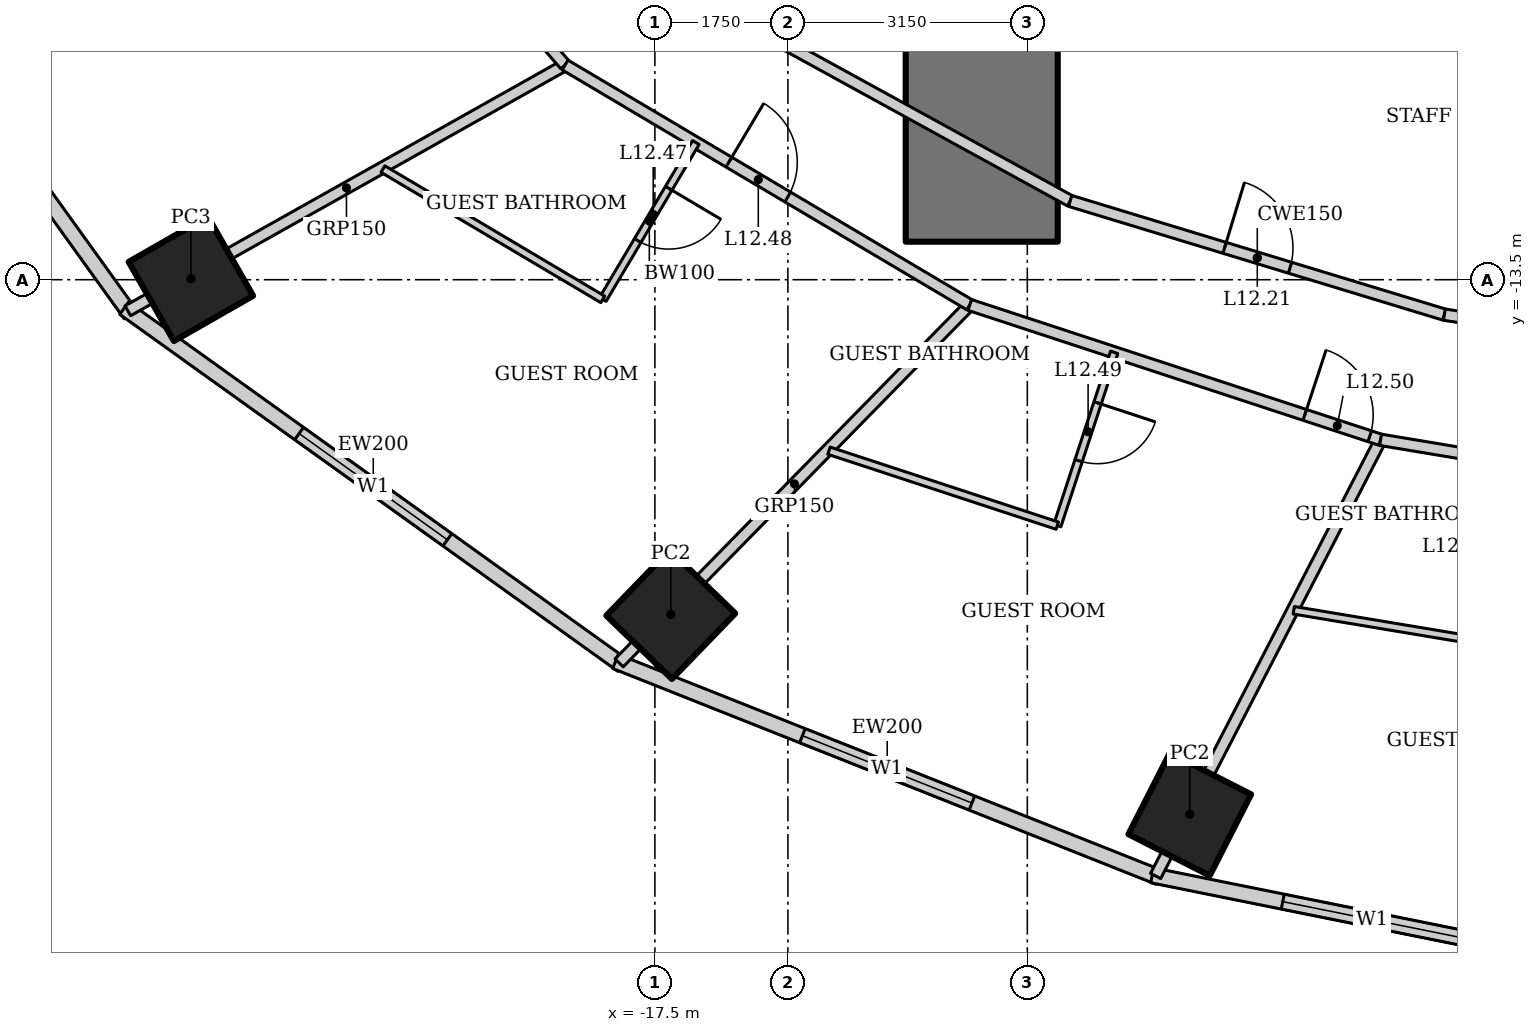
"""IFC4 building model, lengths in metres.
Left out: names, types, materials, properties, quantities, classifications, styles, units other than length and angle.
Written with IfcOpenShell. Run it as: python <this file> out.ifc"""

import sys

from ifc_helpers import new_model, si_unit, direction, frame, frame_2d, origin, origin_2d, place, context, subcontext, project, spatial, rectangle, hollow_rectangle, extrude, element, fill, save


model = new_model("IFC4")
c1 = context("Model", 3, precision=1e-05, world=origin(), true_north=direction((0.0, 1.0)))
c2 = subcontext(c1, "Body", "Model", "MODEL_VIEW")
j1 = project(units=[si_unit("LENGTHUNIT", "METRE"), si_unit("PLANEANGLEUNIT", "RADIAN")], contexts=[c1])
p1 = place(None, origin())
s1 = spatial("IfcSite", under=j1, at=p1, CompositionType="ELEMENT")
p2 = place(p1, origin())
s2 = spatial("IfcBuilding", under=s1, at=p2, CompositionType="ELEMENT")
p3 = place(p2, frame((0.0, 0.0, 58.6)))
s3 = spatial("IfcBuildingStorey", under=s2, at=p3, CompositionType="ELEMENT", Elevation=58.6)
p4 = place(p3, frame((-23.605, -13.489, 0.0), z_axis=(0.0, 0.0, 1.0), x_axis=(0.86824298017, 0.496139221777, 0.0)))
e1 = element("IfcColumn", 1, at=p4, inside=s3, PredefinedType="COLUMN", context=c2, shape_type="SweptSolid", body=[
    extrude(hollow_rectangle(XDim=1.2, YDim=1.2, WallThickness=0.12, at=origin_2d()), origin(), (0.0, 0.0, 1.0), 3.6),
])
for number, where, z_axis, x_axis in (
    (2, (-17.291, -17.905, 0.0), (0.0, 0.0, 1.0), (0.695, 0.719, 0.0)),
    (3, (-10.463, -20.534, 0.0), (0.0, 0.0, 1.0), (0.454, 0.891, 0.0)),
):
    element("IfcColumn", number, at=place(p3, frame(where, z_axis=z_axis, x_axis=x_axis)), inside=s3, PredefinedType="COLUMN", context=c2, shape_type="SweptSolid", body=[
        extrude(hollow_rectangle(XDim=1.2, YDim=1.2, WallThickness=0.1, at=origin_2d()), origin(), (0.0, 0.0, 1.0), 3.6),
    ])
p5 = place(p3, frame((-13.2, 13.0, 0.0), z_axis=(0.0, 0.0, 1.0), x_axis=(0.0, -1.0, 0.0)))
e4 = element("IfcWall", 4, at=p5, inside=s3, PredefinedType="SHEAR", context=c2, shape_type="SweptSolid", body=[
    extrude(rectangle(XDim=26.0, YDim=2.0, at=frame_2d((13.0, 0.0))), origin(), (0.0, 0.0, 1.0), 3.6),
])
p6 = place(p5, frame((12.1, 0.0, 0.0)))
e5 = element("IfcOpeningElement", 5, at=p6, cuts=e4, PredefinedType="OPENING", context=c2, shape_type="SweptSolid", body=[
    extrude(rectangle(XDim=1.8, YDim=2.1, at=frame_2d((0.9, 1.05))), frame((0.0, 1.01, 0.0), z_axis=(0.0, -1.0, 0.0), x_axis=(1.0, 0.0, 0.0)), (0.0, 0.0, 1.0), 2.02),
])
p7 = place(p3, frame((-29.26, -7.2, 0.0), z_axis=(0.0, 0.0, 1.0), x_axis=(0.583937613703, -0.811798536155, 0.0)))
e6 = element("IfcWall", 6, at=p7, inside=s3, PredefinedType="SOLIDWALL", context=c2, shape_type="SweptSolid", body=[
    extrude(rectangle(XDim=8.323, YDim=0.2, at=frame_2d((4.162, 0.0))), origin(), (0.0, 0.0, 1.0), 3.45),
])
p8 = place(p7, frame((2.961, 0.0, 0.5)))
e7 = element("IfcOpeningElement", 7, at=p8, cuts=e6, PredefinedType="OPENING", context=c2, shape_type="SweptSolid", body=[
    extrude(rectangle(XDim=2.4, YDim=2.2, at=frame_2d((1.2, 1.1))), frame((0.0, 0.11, 0.0), z_axis=(0.0, -1.0, 0.0), x_axis=(1.0, 0.0, 0.0)), (0.0, 0.0, 1.0), 0.22),
])
p9 = place(p3, frame((-24.482, -13.875, 0.0), z_axis=(0.0, 0.0, 1.0), x_axis=(0.812791321576, -0.582554948112, 0.0)))
e8 = element("IfcWall", 8, at=p9, inside=s3, PredefinedType="SOLIDWALL", context=c2, shape_type="SweptSolid", body=[
    extrude(rectangle(XDim=8.063, YDim=0.2, at=frame_2d((4.032, 0.0))), origin(), (0.0, 0.0, 1.0), 3.45),
])
p10 = place(p9, frame((2.832, 0.0, 0.5)))
e9 = element("IfcOpeningElement", 9, at=p10, cuts=e8, PredefinedType="OPENING", context=c2, shape_type="SweptSolid", body=[
    extrude(rectangle(XDim=2.4, YDim=2.2, at=frame_2d((1.2, 1.1))), frame((0.0, 0.11, 0.0), z_axis=(0.0, -1.0, 0.0), x_axis=(1.0, 0.0, 0.0)), (0.0, 0.0, 1.0), 0.22),
])
p11 = place(p3, frame((-18.018, -18.523, 0.0), z_axis=(0.0, 0.0, 1.0), x_axis=(0.929358351251, -0.369178892895, 0.0)))
e10 = element("IfcWall", 10, at=p11, inside=s3, PredefinedType="SOLIDWALL", context=c2, shape_type="SweptSolid", body=[
    extrude(rectangle(XDim=7.692, YDim=0.2, at=frame_2d((3.846, 0.0))), origin(), (0.0, 0.0, 1.0), 3.45),
])
p12 = place(p11, frame((2.646, 0.0, 0.5)))
e11 = element("IfcOpeningElement", 11, at=p12, cuts=e10, PredefinedType="OPENING", context=c2, shape_type="SweptSolid", body=[
    extrude(rectangle(XDim=2.4, YDim=2.2, at=frame_2d((1.2, 1.1))), frame((0.0, 0.11, 0.0), z_axis=(0.0, -1.0, 0.0), x_axis=(1.0, 0.0, 0.0)), (0.0, 0.0, 1.0), 0.22),
])
p13 = place(p3, frame((-10.957, -21.337, 0.0), z_axis=(0.0, 0.0, 1.0), x_axis=(0.980251657452, -0.197754110105, 0.0)))
e12 = element("IfcWall", 12, at=p13, inside=s3, PredefinedType="SOLIDWALL", context=c2, shape_type="SweptSolid", body=[
    extrude(rectangle(XDim=5.904, YDim=0.2, at=frame_2d((2.952, 0.0))), origin(), (0.0, 0.0, 1.0), 3.45),
])
p14 = place(p13, frame((1.752, 0.0, 0.5)))
e13 = element("IfcOpeningElement", 13, at=p14, cuts=e12, PredefinedType="OPENING", context=c2, shape_type="SweptSolid", body=[
    extrude(rectangle(XDim=2.4, YDim=2.2, at=frame_2d((1.2, 1.1))), frame((0.0, 0.11, 0.0), z_axis=(0.0, -1.0, 0.0), x_axis=(1.0, 0.0, 0.0)), (0.0, 0.0, 1.0), 0.22),
])
p15 = place(p3, frame((-24.435, -13.909, 0.0), z_axis=(0.0, 0.0, 1.0), x_axis=(0.871747379892, 0.489955616001, 0.0)))
e14 = element("IfcWall", 14, at=p15, inside=s3, PredefinedType="PARTITIONING", context=c2, shape_type="SweptSolid", body=[
    extrude(rectangle(XDim=6.6, YDim=0.15, at=frame_2d((3.3, 0.0))), origin(), (0.0, 0.0, 1.0), 2.693),
])
p16 = place(p3, frame((-17.97, -18.542, 0.0), z_axis=(0.0, 0.0, 1.0), x_axis=(0.699736251994, 0.714401272147, 0.0)))
e15 = element("IfcWall", 15, at=p16, inside=s3, PredefinedType="PARTITIONING", context=c2, shape_type="SweptSolid", body=[
    extrude(rectangle(XDim=6.593, YDim=0.15, at=frame_2d((3.296, 0.0))), origin(), (0.0, 0.0, 1.0), 2.528),
])
p17 = place(p3, frame((-10.912, -21.346, 0.0), z_axis=(0.0, 0.0, 1.0), x_axis=(0.458384799126, 0.888753833145, 0.0)))
e16 = element("IfcWall", 16, at=p17, inside=s3, PredefinedType="PARTITIONING", context=c2, shape_type="SweptSolid", body=[
    extrude(rectangle(XDim=6.457, YDim=0.15, at=frame_2d((3.229, 0.0))), origin(), (0.0, 0.0, 1.0), 2.528),
])
p18 = place(p3, frame((-22.976, -5.729, 0.0), z_axis=(0.0, 0.0, 1.0), x_axis=(0.655599989166, -0.755108372491, 0.0)))
e17 = element("IfcWall", 17, at=p18, inside=s3, PredefinedType="PARTITIONING", context=c2, shape_type="SweptSolid", body=[
    extrude(rectangle(XDim=6.551, YDim=0.15, at=frame_2d((3.275, 0.0))), origin(), (0.0, 0.0, 1.0), 3.45),
])
p19 = place(p18, frame((2.1, 0.0, 0.0)))
e18 = element("IfcOpeningElement", 18, at=p19, cuts=e17, PredefinedType="OPENING", context=c2, shape_type="SweptSolid", body=[
    extrude(rectangle(XDim=0.9, YDim=2.1, at=frame_2d((0.45, 1.05))), frame((0.0, 0.085, 0.0), z_axis=(0.0, -1.0, 0.0), x_axis=(1.0, 0.0, 0.0)), (0.0, 0.0, 1.0), 0.17),
])
p20 = place(p3, frame((-18.681, -10.675, 0.0), z_axis=(0.0, 0.0, 1.0), x_axis=(0.860147339762, -0.510045639036, 0.0)))
e19 = element("IfcWall", 19, at=p20, inside=s3, PredefinedType="PARTITIONING", context=c2, shape_type="SweptSolid", body=[
    extrude(rectangle(XDim=6.19, YDim=0.15, at=frame_2d((3.095, 0.0))), origin(), (0.0, 0.0, 1.0), 3.45),
])
p21 = place(p20, frame((2.505, 0.0, 0.0)))
e20 = element("IfcOpeningElement", 20, at=p21, cuts=e19, PredefinedType="OPENING", context=c2, shape_type="SweptSolid", body=[
    extrude(rectangle(XDim=0.9, YDim=2.1, at=frame_2d((0.45, 1.05))), frame((0.0, 0.085, 0.0), z_axis=(0.0, -1.0, 0.0), x_axis=(1.0, 0.0, 0.0)), (0.0, 0.0, 1.0), 0.17),
])
p22 = place(p3, frame((-13.357, -13.832, 0.0), z_axis=(0.0, 0.0, 1.0), x_axis=(0.950106803111, -0.311924770869, 0.0)))
e21 = element("IfcWall", 21, at=p22, inside=s3, PredefinedType="PARTITIONING", context=c2, shape_type="SweptSolid", body=[
    extrude(rectangle(XDim=5.689, YDim=0.15, at=frame_2d((2.845, 0.0))), origin(), (0.0, 0.0, 1.0), 3.45),
])
p23 = place(p22, frame((4.639, 0.0, 0.0)))
e22 = element("IfcOpeningElement", 22, at=p23, cuts=e21, PredefinedType="OPENING", context=c2, shape_type="SweptSolid", body=[
    extrude(rectangle(XDim=0.9, YDim=2.1, at=frame_2d((0.45, 1.05))), frame((0.0, 0.085, 0.0), z_axis=(0.0, -1.0, 0.0), x_axis=(1.0, 0.0, 0.0)), (0.0, 0.0, 1.0), 0.17),
])
p24 = place(p3, frame((-7.952, -15.607, 0.0), z_axis=(0.0, 0.0, 1.0), x_axis=(0.98641101506, -0.164296407044, 0.0)))
e23 = element("IfcWall", 23, at=p24, inside=s3, PredefinedType="PARTITIONING", context=c2, shape_type="SweptSolid", body=[
    extrude(rectangle(XDim=4.245, YDim=0.15, at=frame_2d((2.123, 0.0))), origin(), (0.0, 0.0, 1.0), 3.45),
])
p25 = place(p24, frame((2.1, 0.0, 0.0)))
e24 = element("IfcOpeningElement", 24, at=p25, cuts=e23, PredefinedType="OPENING", context=c2, shape_type="SweptSolid", body=[
    extrude(rectangle(XDim=0.9, YDim=2.1, at=frame_2d((0.45, 1.05))), frame((0.0, 0.085, 0.0), z_axis=(0.0, -1.0, 0.0), x_axis=(1.0, 0.0, 0.0)), (0.0, 0.0, 1.0), 0.17),
])
p26 = place(p3, frame((-17.021, -9.726, 0.0), z_axis=(0.0, 0.0, 1.0), x_axis=(0.876522084062, -0.481361647986, 0.0)))
e25 = element("IfcWall", 25, at=p26, inside=s3, PredefinedType="PARTITIONING", context=c2, shape_type="SweptSolid", body=[
    extrude(rectangle(XDim=5.687, YDim=0.15, at=frame_2d((2.844, 0.0))), origin(), (0.0, 0.0, 1.0), 3.45),
])
p27 = place(p3, frame((-12.036, -12.464, 0.0), z_axis=(0.0, 0.0, 1.0), x_axis=(0.956795045135, -0.290763205385, 0.0)))
e26 = element("IfcWall", 26, at=p27, inside=s3, PredefinedType="PARTITIONING", context=c2, shape_type="SweptSolid", body=[
    extrude(rectangle(XDim=5.146, YDim=0.15, at=frame_2d((2.573, 0.0))), origin(), (0.0, 0.0, 1.0), 3.45),
])
p28 = place(p27, frame((2.123, 0.0, 0.0)))
e27 = element("IfcOpeningElement", 27, at=p28, cuts=e26, PredefinedType="OPENING", context=c2, shape_type="SweptSolid", body=[
    extrude(rectangle(XDim=0.9, YDim=2.1, at=frame_2d((0.45, 1.05))), frame((0.0, 0.085, 0.0), z_axis=(0.0, -1.0, 0.0), x_axis=(1.0, 0.0, 0.0)), (0.0, 0.0, 1.0), 0.17),
])
p29 = place(p3, frame((-7.113, -13.96, 0.0), z_axis=(0.0, 0.0, 1.0), x_axis=(0.988343461108, -0.152240608529, 0.0)))
e28 = element("IfcWall", 28, at=p29, inside=s3, PredefinedType="PARTITIONING", context=c2, shape_type="SweptSolid", body=[
    extrude(rectangle(XDim=3.801, YDim=0.15, at=frame_2d((1.9, 0.0))), origin(), (0.0, 0.0, 1.0), 3.45),
])
p30 = place(p3, frame((-16.961, -11.695, 0.0), z_axis=(0.0, 0.0, 1.0), x_axis=(-0.510075642074, -0.860129548012, 0.0)))
e29 = element("IfcWall", 29, at=p30, inside=s3, PredefinedType="PARTITIONING", context=c2, shape_type="SweptSolid", body=[
    extrude(rectangle(XDim=2.4, YDim=0.1, at=frame_2d((1.2, 0.0))), origin(), (0.0, 0.0, 1.0), 3.45),
])
p31 = place(p30, frame((0.7, 0.0, 0.0)))
e30 = element("IfcOpeningElement", 30, at=p31, cuts=e29, PredefinedType="OPENING", context=c2, shape_type="SweptSolid", body=[
    extrude(rectangle(XDim=0.8, YDim=2.1, at=frame_2d((0.4, 1.05))), frame((0.0, 0.06, 0.0), z_axis=(0.0, -1.0, 0.0), x_axis=(1.0, 0.0, 0.0)), (0.0, 0.0, 1.0), 0.12),
])
p32 = place(p3, frame((-18.185, -13.76, 0.0), z_axis=(0.0, 0.0, 1.0), x_axis=(-0.860146437071, 0.510047161343, 0.0)))
e31 = element("IfcWall", 31, at=p32, inside=s3, PredefinedType="PARTITIONING", context=c2, shape_type="SweptSolid", body=[
    extrude(rectangle(XDim=3.363, YDim=0.1, at=frame_2d((1.681, 0.0))), origin(), (0.0, 0.0, 1.0), 3.45),
])
p33 = place(p3, frame((-11.457, -14.456, 0.0), z_axis=(0.0, 0.0, 1.0), x_axis=(-0.311890952591, -0.950117905153, 0.0)))
e32 = element("IfcWall", 32, at=p33, inside=s3, PredefinedType="PARTITIONING", context=c2, shape_type="SweptSolid", body=[
    extrude(rectangle(XDim=2.4, YDim=0.1, at=frame_2d((1.2, 0.0))), origin(), (0.0, 0.0, 1.0), 3.45),
])
p34 = place(p33, frame((0.7, 0.0, 0.0)))
e33 = element("IfcOpeningElement", 33, at=p34, cuts=e32, PredefinedType="OPENING", context=c2, shape_type="SweptSolid", body=[
    extrude(rectangle(XDim=0.8, YDim=2.1, at=frame_2d((0.4, 1.05))), frame((0.0, 0.06, 0.0), z_axis=(0.0, -1.0, 0.0), x_axis=(1.0, 0.0, 0.0)), (0.0, 0.0, 1.0), 0.12),
])
p35 = place(p3, frame((-12.206, -16.736, 0.0), z_axis=(0.0, 0.0, 1.0), x_axis=(-0.950109912386, 0.311915300018, 0.0)))
e34 = element("IfcWall", 34, at=p35, inside=s3, PredefinedType="PARTITIONING", context=c2, shape_type="SweptSolid", body=[
    extrude(rectangle(XDim=3.161, YDim=0.1, at=frame_2d((1.581, 0.0))), origin(), (0.0, 0.0, 1.0), 3.45),
])
p36 = place(p3, frame((-6.374, -18.303, 0.0), z_axis=(0.0, 0.0, 1.0), x_axis=(-0.98640348956, 0.164341582641, 0.0)))
e35 = element("IfcWall", 35, at=p36, inside=s3, PredefinedType="PARTITIONING", context=c2, shape_type="SweptSolid", body=[
    extrude(rectangle(XDim=2.759, YDim=0.1, at=frame_2d((1.379, 0.0))), origin(), (0.0, 0.0, 1.0), 3.45),
])
p37 = place(p10, origin())
e36 = element("IfcWindow", 36, at=p37, inside=s3, PartitioningType="SINGLE_PANEL", PredefinedType="WINDOW", context=c2, shape_type="SweptSolid", body=[
    extrude(rectangle(XDim=2.4, YDim=2.2, at=frame_2d((1.2, 1.1))), frame((0.0, 0.03, 0.0), z_axis=(0.0, -1.0, 0.0), x_axis=(1.0, 0.0, 0.0)), (0.0, 0.0, 1.0), 0.06),
])
fill(e9, e36)
p38 = place(p12, origin())
e37 = element("IfcWindow", 37, at=p38, inside=s3, PartitioningType="SINGLE_PANEL", PredefinedType="WINDOW", context=c2, shape_type="SweptSolid", body=[
    extrude(rectangle(XDim=2.4, YDim=2.2, at=frame_2d((1.2, 1.1))), frame((0.0, 0.03, 0.0), z_axis=(0.0, -1.0, 0.0), x_axis=(1.0, 0.0, 0.0)), (0.0, 0.0, 1.0), 0.06),
])
fill(e11, e37)
p39 = place(p14, origin())
e38 = element("IfcWindow", 38, at=p39, inside=s3, PartitioningType="SINGLE_PANEL", PredefinedType="WINDOW", context=c2, shape_type="SweptSolid", body=[
    extrude(rectangle(XDim=2.4, YDim=2.2, at=frame_2d((1.2, 1.1))), frame((0.0, 0.03, 0.0), z_axis=(0.0, -1.0, 0.0), x_axis=(1.0, 0.0, 0.0)), (0.0, 0.0, 1.0), 0.06),
])
fill(e13, e38)
p40 = place(p28, origin())
e39 = element("IfcDoor", 39, at=p40, inside=s3, OperationType="SINGLE_SWING_LEFT", PredefinedType="DOOR", context=c2, shape_type="SweptSolid", body=[
    extrude(rectangle(XDim=0.9, YDim=2.1, at=frame_2d((0.45, 1.05))), frame((0.0, 0.025, 0.0), z_axis=(0.0, -1.0, 0.0), x_axis=(1.0, 0.0, 0.0)), (0.0, 0.0, 1.0), 0.05),
])
fill(e27, e39)
p41 = place(p31, origin())
e40 = element("IfcDoor", 40, at=p41, inside=s3, OperationType="SINGLE_SWING_LEFT", PredefinedType="DOOR", context=c2, shape_type="SweptSolid", body=[
    extrude(rectangle(XDim=0.8, YDim=2.1, at=frame_2d((0.4, 1.05))), frame((0.0, 0.025, 0.0), z_axis=(0.0, -1.0, 0.0), x_axis=(1.0, 0.0, 0.0)), (0.0, 0.0, 1.0), 0.05),
])
fill(e30, e40)
p42 = place(p21, origin())
e41 = element("IfcDoor", 41, at=p42, inside=s3, OperationType="SINGLE_SWING_LEFT", PredefinedType="DOOR", context=c2, shape_type="SweptSolid", body=[
    extrude(rectangle(XDim=0.9, YDim=2.1, at=frame_2d((0.45, 1.05))), frame((0.0, 0.025, 0.0), z_axis=(0.0, -1.0, 0.0), x_axis=(1.0, 0.0, 0.0)), (0.0, 0.0, 1.0), 0.05),
])
fill(e20, e41)
p43 = place(p34, origin())
e42 = element("IfcDoor", 42, at=p43, inside=s3, OperationType="SINGLE_SWING_LEFT", PredefinedType="DOOR", context=c2, shape_type="SweptSolid", body=[
    extrude(rectangle(XDim=0.8, YDim=2.1, at=frame_2d((0.4, 1.05))), frame((0.0, 0.025, 0.0), z_axis=(0.0, -1.0, 0.0), x_axis=(1.0, 0.0, 0.0)), (0.0, 0.0, 1.0), 0.05),
])
fill(e33, e42)
p44 = place(p23, origin())
e43 = element("IfcDoor", 43, at=p44, inside=s3, OperationType="SINGLE_SWING_LEFT", PredefinedType="DOOR", context=c2, shape_type="SweptSolid", body=[
    extrude(rectangle(XDim=0.9, YDim=2.1, at=frame_2d((0.45, 1.05))), frame((0.0, 0.025, 0.0), z_axis=(0.0, -1.0, 0.0), x_axis=(1.0, 0.0, 0.0)), (0.0, 0.0, 1.0), 0.05),
])
fill(e22, e43)
save(model, sys.argv[1])
